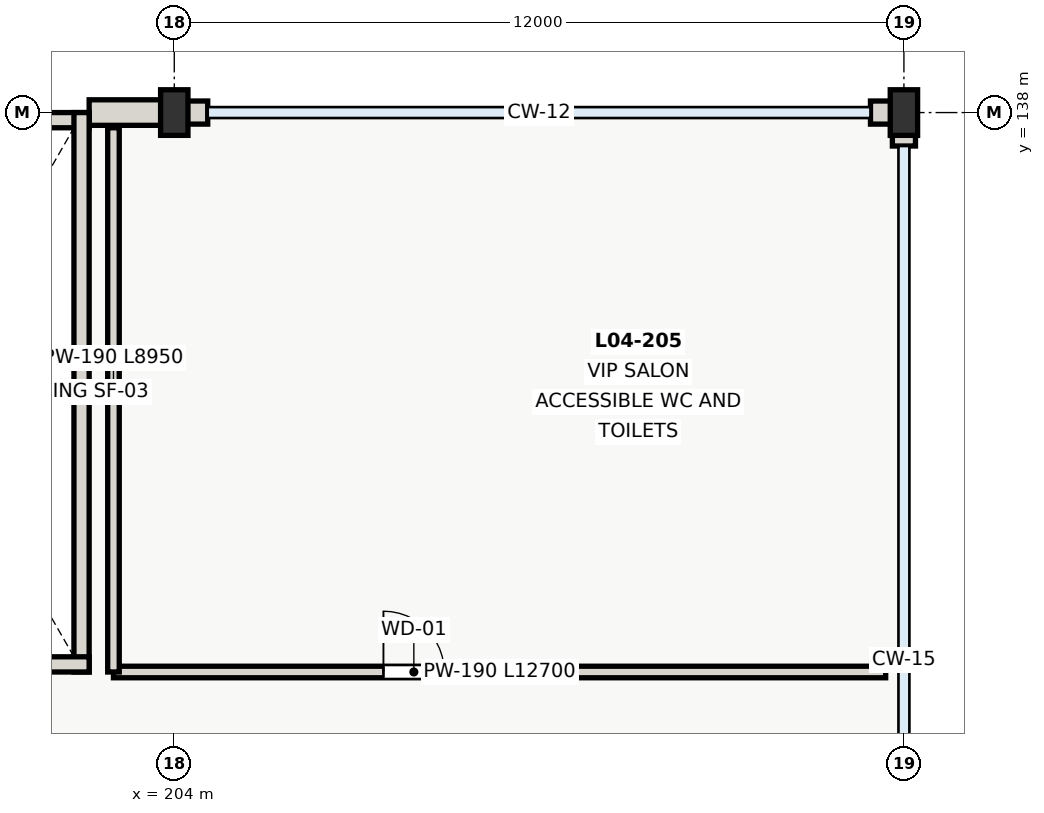
"""IFC4 building model, lengths in metres.
Left out: names, types, materials, properties, quantities, classifications, styles, units other than length and angle.
Written with IfcOpenShell. Run it as: python <this file> out.ifc"""

import sys

from ifc_helpers import new_model, si_unit, direction, frame, frame_2d, origin, origin_2d, place, context, subcontext, project, spatial, rectangle, extrude, element, fill, save


model = new_model("IFC4")
c1 = context("Model", 3, precision=1e-05, world=origin(), true_north=direction((0.0, 1.0)))
c2 = subcontext(c1, "Body", "Model", "MODEL_VIEW")
j1 = project(units=[si_unit("LENGTHUNIT", "METRE"), si_unit("PLANEANGLEUNIT", "RADIAN")], contexts=[c1])
p1 = place(None, origin())
s1 = spatial("IfcSite", under=j1, at=p1, CompositionType="ELEMENT")
p2 = place(p1, origin())
s2 = spatial("IfcBuilding", under=s1, at=p2, CompositionType="ELEMENT")
p3 = place(p2, frame((0.0, 0.0, 12.6)))
s3 = spatial("IfcBuildingStorey", under=s2, at=p3, CompositionType="ELEMENT", Elevation=12.6)
for number, where, z_axis, x_axis in (
    (1, (204.0, 138.0, 0.0), (0.0, 0.0, 1.0), (1.0, 0.0, 0.0)),
    (2, (216.0, 138.0, 0.0), (0.0, 0.0, 1.0), (1.0, 0.0, 0.0)),
):
    element("IfcColumn", number, at=place(p3, frame(where, z_axis=z_axis, x_axis=x_axis)), inside=s3, PredefinedType="PILASTER", context=c2, shape_type="SweptSolid", body=[
        extrude(rectangle(XDim=0.45, YDim=0.75, at=origin_2d()), origin(), (0.0, 0.0, 1.0), 4.8),
    ])
p4 = place(p3, frame((202.6, 138.0, 0.0), z_axis=(0.0, 0.0, 1.0), x_axis=(1.0, 0.0, 0.0)))
e3 = element("IfcWall", 3, at=p4, inside=s3, PredefinedType="SOLIDWALL", context=c2, shape_type="SweptSolid", body=[
    extrude(rectangle(XDim=1.4, YDim=0.42, at=frame_2d((0.7, 0.0))), origin(), (0.0, 0.0, 1.0), 3.57),
])
p5 = place(p3, frame((204.002, 138.0, 0.0), z_axis=(0.0, 0.0, 1.0), x_axis=(1.0, 0.0, 0.0)))
e4 = element("IfcWall", 4, at=p5, inside=s3, PredefinedType="SOLIDWALL", context=c2, shape_type="SweptSolid", body=[
    extrude(rectangle(XDim=0.548, YDim=0.38, at=frame_2d((0.274, 0.0))), origin(), (0.0, 0.0, 1.0), 3.55),
])
p6 = place(p3, frame((215.45, 138.0, 0.0), z_axis=(0.0, 0.0, 1.0), x_axis=(1.0, 0.0, 0.0)))
e5 = element("IfcWall", 5, at=p6, inside=s3, PredefinedType="SOLIDWALL", context=c2, shape_type="SweptSolid", body=[
    extrude(rectangle(XDim=0.55, YDim=0.38, at=frame_2d((0.275, 0.0))), origin(), (0.0, 0.0, 1.0), 3.55),
])
p7 = place(p3, frame((216.0, 137.808, 0.0), z_axis=(0.0, 0.0, 1.0), x_axis=(0.0, -1.0, 0.0)))
e6 = element("IfcWall", 6, at=p7, inside=s3, PredefinedType="SOLIDWALL", context=c2, shape_type="SweptSolid", body=[
    extrude(rectangle(XDim=0.358, YDim=0.38, at=frame_2d((0.179, 0.0))), origin(), (0.0, 0.0, 1.0), 3.35),
])
p8 = place(p3, frame((193.4, 137.875, 0.0), z_axis=(0.0, 0.0, 1.0), x_axis=(1.0, 0.0, 0.0)))
e7 = element("IfcWall", 7, at=p8, inside=s3, PredefinedType="SHEAR", context=c2, shape_type="SweptSolid", body=[
    extrude(rectangle(XDim=9.2, YDim=0.25, at=frame_2d((4.6, 0.0))), origin(), (0.0, 0.0, 1.0), 5.6),
])
p9 = place(p3, frame((202.475, 138.0, 0.0), z_axis=(0.0, 0.0, 1.0), x_axis=(0.0, -1.0, 0.0)))
e8 = element("IfcWall", 8, at=p9, inside=s3, PredefinedType="SHEAR", context=c2, shape_type="SweptSolid", body=[
    extrude(rectangle(XDim=9.2, YDim=0.25, at=frame_2d((4.6, 0.0))), origin(), (0.0, 0.0, 1.0), 5.6),
])
p10 = place(p3, frame((202.6, 128.925, 0.0), z_axis=(0.0, 0.0, 1.0), x_axis=(-1.0, 0.0, 0.0)))
e9 = element("IfcWall", 9, at=p10, inside=s3, PredefinedType="SHEAR", context=c2, shape_type="SweptSolid", body=[
    extrude(rectangle(XDim=9.2, YDim=0.25, at=frame_2d((4.6, 0.0))), origin(), (0.0, 0.0, 1.0), 5.6),
])
p11 = place(p3, frame((203.0, 128.8, 0.0), z_axis=(0.0, 0.0, 1.0), x_axis=(1.0, 0.0, 0.0)))
e10 = element("IfcWall", 10, at=p11, inside=s3, PredefinedType="PLUMBINGWALL", context=c2, shape_type="SweptSolid", body=[
    extrude(rectangle(XDim=12.7, YDim=0.19, at=frame_2d((6.35, 0.0))), origin(), (0.0, 0.0, 1.0), 3.78),
])
p12 = place(p11, frame((4.44, 0.0, 0.0)))
e11 = element("IfcOpeningElement", 11, at=p12, cuts=e10, PredefinedType="OPENING", context=c2, shape_type="SweptSolid", body=[
    extrude(rectangle(XDim=1.0, YDim=2.1, at=frame_2d((0.5, 1.05))), frame((0.0, 0.105, 0.0), z_axis=(0.0, -1.0, 0.0), x_axis=(1.0, 0.0, 0.0)), (0.0, 0.0, 1.0), 0.21),
])
p13 = place(p3, frame((203.0, 128.8, 0.0), z_axis=(0.0, 0.0, 1.0), x_axis=(0.0, 1.0, 0.0)))
e12 = element("IfcWall", 12, at=p13, inside=s3, PredefinedType="PLUMBINGWALL", context=c2, shape_type="SweptSolid", body=[
    extrude(rectangle(XDim=8.95, YDim=0.19, at=frame_2d((4.475, 0.0))), origin(), (0.0, 0.0, 1.0), 3.78),
])
p14 = place(p12, origin())
e13 = element("IfcDoor", 13, at=p14, inside=s3, OperationType="SINGLE_SWING_LEFT", PredefinedType="DOOR", context=c2, shape_type="SweptSolid", body=[
    extrude(rectangle(XDim=1.0, YDim=2.1, at=frame_2d((0.5, 1.05))), frame((0.0, 0.025, 0.0), z_axis=(0.0, -1.0, 0.0), x_axis=(1.0, 0.0, 0.0)), (0.0, 0.0, 1.0), 0.05),
])
fill(e11, e13)
save(model, sys.argv[1])
